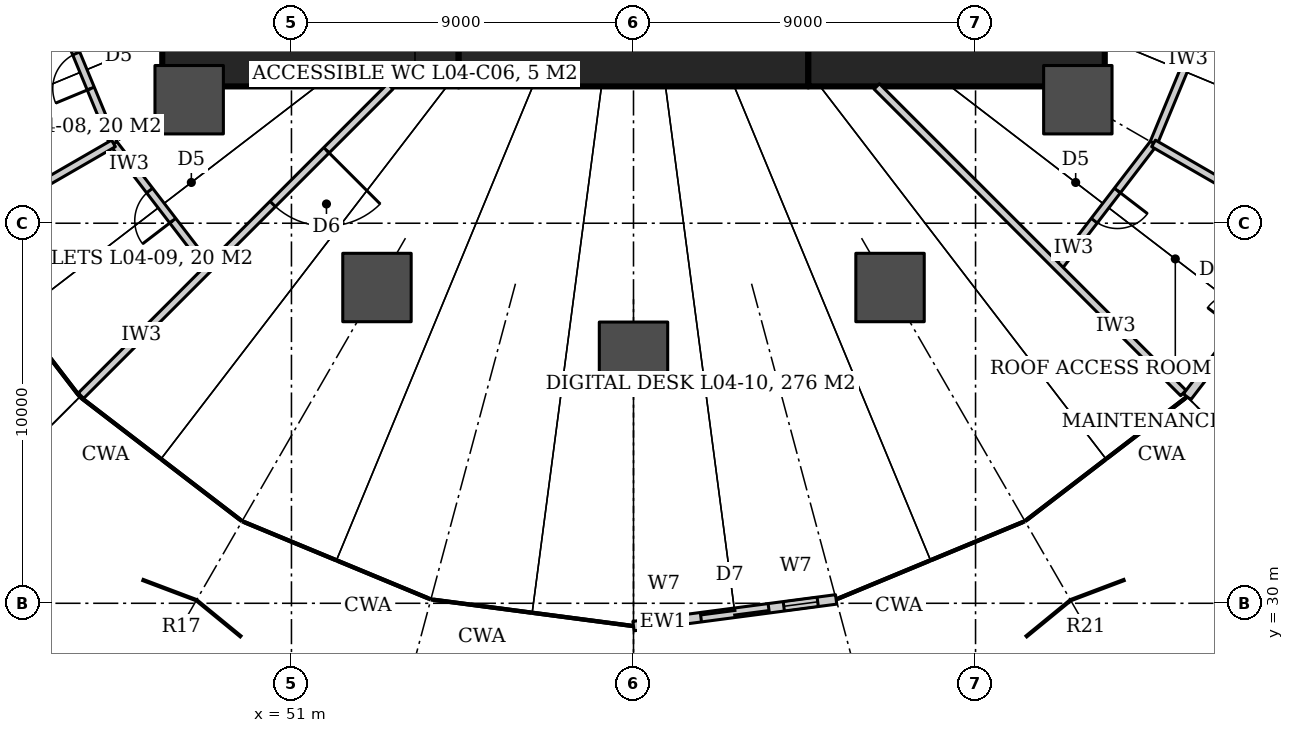
"""IFC4 building model, lengths in metres.
Left out: names, types, materials, properties, quantities, classifications, styles, units other than length and angle.
Written with IfcOpenShell. Run it as: python <this file> out.ifc"""

import sys

from ifc_helpers import new_model, si_unit, direction, frame, frame_2d, origin, origin_2d, place, context, subcontext, project, spatial, rectangle, hollow_circle, extrude, element, fill, save


model = new_model("IFC4")
c1 = context("Model", 3, precision=1e-05, world=origin(), true_north=direction((0.0, 1.0)))
c2 = subcontext(c1, "Body", "Model", "MODEL_VIEW")
j1 = project(units=[si_unit("LENGTHUNIT", "METRE"), si_unit("PLANEANGLEUNIT", "RADIAN")], contexts=[c1])
p1 = place(None, origin())
s1 = spatial("IfcSite", under=j1, at=p1, CompositionType="ELEMENT")
p2 = place(p1, origin())
s2 = spatial("IfcBuilding", under=s1, at=p2, CompositionType="ELEMENT")
p3 = place(p2, frame((0.0, 0.0, 26.0)))
s3 = spatial("IfcBuildingStorey", under=s2, at=p3, CompositionType="ELEMENT", Elevation=26.0)
p4 = place(p3, frame((47.6, 44.5, 0.0), z_axis=(0.0, 0.0, 1.0), x_axis=(1.0, 0.0, 0.0)))
e1 = element("IfcWall", 1, at=p4, inside=s3, PredefinedType="SHEAR", context=c2, shape_type="SweptSolid", body=[
    extrude(rectangle(XDim=7.8, YDim=1.8, at=frame_2d((3.9, 0.0))), origin(), (0.0, 0.0, 1.0), 4.2),
])
p5 = place(p3, frame((55.4, 44.5, 0.0), z_axis=(0.0, 0.0, 1.0), x_axis=(1.0, 0.0, 0.0)))
e2 = element("IfcWall", 2, at=p5, inside=s3, PredefinedType="SHEAR", context=c2, shape_type="SweptSolid", body=[
    extrude(rectangle(XDim=9.2, YDim=1.8, at=frame_2d((4.6, 0.0))), origin(), (0.0, 0.0, 1.0), 4.2),
])
p6 = place(p3, frame((64.6, 44.5, 0.0), z_axis=(0.0, 0.0, 1.0), x_axis=(1.0, 0.0, 0.0)))
e3 = element("IfcWall", 3, at=p6, inside=s3, PredefinedType="SHEAR", context=c2, shape_type="SweptSolid", body=[
    extrude(rectangle(XDim=7.8, YDim=1.8, at=frame_2d((3.9, 0.0))), origin(), (0.0, 0.0, 1.0), 4.2),
])
for number, where, z_axis, x_axis in (
    (4, (48.309, 43.25, -0.16), (0.0, 0.0, 1.0), (1.0, 0.0, 0.0)),
    (5, (53.25, 38.309, -0.16), (0.0, 0.0, 1.0), (1.0, 0.0, 0.0)),
    (6, (60.0, 36.5, -0.16), (0.0, 0.0, 1.0), (1.0, 0.0, 0.0)),
    (7, (66.75, 38.309, -0.16), (0.0, 0.0, 1.0), (1.0, 0.0, 0.0)),
    (8, (71.691, 43.25, -0.16), (0.0, 0.0, 1.0), (1.0, 0.0, 0.0)),
):
    element("IfcColumn", number, at=place(p3, frame(where, z_axis=z_axis, x_axis=x_axis)), inside=s3, PredefinedType="COLUMN", context=c2, shape_type="SweptSolid", body=[
        extrude(hollow_circle(Radius=0.9, WallThickness=0.09, at=origin_2d()), origin(), (0.0, 0.0, 1.0), 4.36),
    ])
p7 = place(p3, frame((48.828, 38.828, 0.0), z_axis=(0.0, 0.0, 1.0), x_axis=(-0.608714823874, 0.793389099494, 0.0)))
e9 = element("IfcWall", 9, at=p7, inside=s3, PredefinedType="PARTITIONING", context=c2, shape_type="SweptSolid", body=[
    extrude(rectangle(XDim=4.125, YDim=0.2, at=frame_2d((2.062, 0.0))), origin(), (0.0, 0.0, 1.0), 3.04),
])
p8 = place(p7, frame((1.562, 0.0, 0.0)))
e10 = element("IfcOpeningElement", 10, at=p8, cuts=e9, PredefinedType="OPENING", context=c2, shape_type="SweptSolid", body=[
    extrude(rectangle(XDim=1.0, YDim=2.1, at=frame_2d((0.5, 1.05))), frame((0.0, 0.11, 0.0), z_axis=(0.0, -1.0, 0.0), x_axis=(1.0, 0.0, 0.0)), (0.0, 0.0, 1.0), 0.22),
])
p9 = place(p3, frame((46.317, 42.1, 0.0), z_axis=(0.0, 0.0, 1.0), x_axis=(-0.382731667114, 0.923859551549, 0.0)))
e11 = element("IfcWall", 11, at=p9, inside=s3, PredefinedType="PARTITIONING", context=c2, shape_type="SweptSolid", body=[
    extrude(rectangle(XDim=4.125, YDim=0.2, at=frame_2d((2.062, 0.0))), origin(), (0.0, 0.0, 1.0), 3.04),
])
p10 = place(p9, frame((1.562, 0.0, 0.0)))
e12 = element("IfcOpeningElement", 12, at=p10, cuts=e11, PredefinedType="OPENING", context=c2, shape_type="SweptSolid", body=[
    extrude(rectangle(XDim=1.0, YDim=2.1, at=frame_2d((0.5, 1.05))), frame((0.0, 0.11, 0.0), z_axis=(0.0, -1.0, 0.0), x_axis=(1.0, 0.0, 0.0)), (0.0, 0.0, 1.0), 0.22),
])
p11 = place(p3, frame((75.262, 45.911, 0.0), z_axis=(0.0, 0.0, 1.0), x_axis=(-0.382731667114, -0.923859551549, 0.0)))
e13 = element("IfcWall", 13, at=p11, inside=s3, PredefinedType="PARTITIONING", context=c2, shape_type="SweptSolid", body=[
    extrude(rectangle(XDim=4.125, YDim=0.2, at=frame_2d((2.062, 0.0))), origin(), (0.0, 0.0, 1.0), 3.04),
])
p12 = place(p3, frame((73.683, 42.1, 0.0), z_axis=(0.0, 0.0, 1.0), x_axis=(-0.608714823874, -0.793389099494, 0.0)))
e14 = element("IfcWall", 14, at=p12, inside=s3, PredefinedType="PARTITIONING", context=c2, shape_type="SweptSolid", body=[
    extrude(rectangle(XDim=4.125, YDim=0.2, at=frame_2d((2.062, 0.0))), origin(), (0.0, 0.0, 1.0), 3.04),
])
p13 = place(p12, frame((1.562, 0.0, 0.0)))
e15 = element("IfcOpeningElement", 15, at=p13, cuts=e14, PredefinedType="OPENING", context=c2, shape_type="SweptSolid", body=[
    extrude(rectangle(XDim=1.0, YDim=2.1, at=frame_2d((0.5, 1.05))), frame((0.0, 0.11, 0.0), z_axis=(0.0, -1.0, 0.0), x_axis=(1.0, 0.0, 0.0)), (0.0, 0.0, 1.0), 0.22),
])
p14 = place(p3, frame((46.317, 42.1, 0.0), z_axis=(0.0, 0.0, 1.0), x_axis=(-0.866015616091, -0.5000169524, 0.0)))
e16 = element("IfcWall", 16, at=p14, inside=s3, PredefinedType="PARTITIONING", context=c2, shape_type="SweptSolid", body=[
    extrude(rectangle(XDim=4.76, YDim=0.2, at=frame_2d((2.38, 0.0))), origin(), (0.0, 0.0, 1.0), 3.04),
])
p15 = place(p3, frame((53.6, 43.6, 0.0), z_axis=(0.0, 0.0, 1.0), x_axis=(-0.707106781187, -0.707106781187, 0.0)))
e17 = element("IfcWall", 17, at=p15, inside=s3, PredefinedType="PARTITIONING", context=c2, shape_type="SweptSolid", body=[
    extrude(rectangle(XDim=11.509, YDim=0.2, at=frame_2d((5.754, 0.0))), origin(), (0.0, 0.0, 1.0), 3.02),
])
p16 = place(p15, frame((2.375, 0.0, 0.0)))
e18 = element("IfcOpeningElement", 18, at=p16, cuts=e17, PredefinedType="OPENING", context=c2, shape_type="SweptSolid", body=[
    extrude(rectangle(XDim=2.0, YDim=2.1, at=frame_2d((1.0, 1.05))), frame((0.0, 0.11, 0.0), z_axis=(0.0, -1.0, 0.0), x_axis=(1.0, 0.0, 0.0)), (0.0, 0.0, 1.0), 0.22),
])
p17 = place(p3, frame((66.4, 43.6, 0.0), z_axis=(0.0, 0.0, 1.0), x_axis=(0.707106781187, -0.707106781187, 0.0)))
e19 = element("IfcWall", 19, at=p17, inside=s3, PredefinedType="PARTITIONING", context=c2, shape_type="SweptSolid", body=[
    extrude(rectangle(XDim=11.409, YDim=0.2, at=frame_2d((5.705, 0.0))), origin(), (0.0, 0.0, 1.0), 3.02),
])
p18 = place(p3, frame((73.683, 42.1, 0.0), z_axis=(0.0, 0.0, 1.0), x_axis=(0.866029425763, -0.499993033663, 0.0)))
e20 = element("IfcWall", 20, at=p18, inside=s3, PredefinedType="PARTITIONING", context=c2, shape_type="SweptSolid", body=[
    extrude(rectangle(XDim=4.66, YDim=0.2, at=frame_2d((2.33, 0.0))), origin(), (0.0, 0.0, 1.0), 3.04),
])
p19 = place(p3, frame((60.0, 29.4, 0.0), z_axis=(0.0, 0.0, 1.0), x_axis=(0.991445794844, 0.130519101615, 0.0)))
e21 = element("IfcWall", 21, at=p19, inside=s3, PredefinedType="SOLIDWALL", context=c2, shape_type="SweptSolid", body=[
    extrude(rectangle(XDim=5.378, YDim=0.25, at=frame_2d((2.689, 0.0))), origin(), (0.0, 0.0, 1.0), 4.04),
])
p20 = place(p19, frame((1.789, 0.0, 0.0)))
e22 = element("IfcOpeningElement", 22, at=p20, cuts=e21, PredefinedType="OPENING", context=c2, shape_type="SweptSolid", body=[
    extrude(rectangle(XDim=1.8, YDim=2.4, at=frame_2d((0.9, 1.2))), frame((0.0, 0.135, 0.0), z_axis=(0.0, -1.0, 0.0), x_axis=(1.0, 0.0, 0.0)), (0.0, 0.0, 1.0), 0.27),
])
p21 = place(p19, frame((0.489, 0.0, 0.0)))
e23 = element("IfcOpeningElement", 23, at=p21, cuts=e21, PredefinedType="OPENING", context=c2, shape_type="SweptSolid", body=[
    extrude(rectangle(XDim=0.9, YDim=2.4, at=frame_2d((0.45, 1.2))), frame((0.0, 0.135, 0.0), z_axis=(0.0, -1.0, 0.0), x_axis=(1.0, 0.0, 0.0)), (0.0, 0.0, 1.0), 0.27),
])
p22 = place(p19, frame((3.989, 0.0, 0.0)))
e24 = element("IfcOpeningElement", 24, at=p22, cuts=e21, PredefinedType="OPENING", context=c2, shape_type="SweptSolid", body=[
    extrude(rectangle(XDim=0.9, YDim=2.4, at=frame_2d((0.45, 1.2))), frame((0.0, 0.135, 0.0), z_axis=(0.0, -1.0, 0.0), x_axis=(1.0, 0.0, 0.0)), (0.0, 0.0, 1.0), 0.27),
])
p23 = place(p3, frame((74.566, 35.434, 0.0), z_axis=(0.0, 0.0, 1.0), x_axis=(0.608760311307, 0.793354197933, 0.0)))
e25 = element("IfcWall", 25, at=p23, inside=s3, PredefinedType="SOLIDWALL", context=c2, shape_type="SweptSolid", body=[
    extrude(rectangle(XDim=5.378, YDim=0.25, at=frame_2d((2.689, 0.0))), origin(), (0.0, 0.0, 1.0), 4.04),
])
p24 = place(p23, frame((2.189, 0.0, 0.0)))
e26 = element("IfcOpeningElement", 26, at=p24, cuts=e25, PredefinedType="OPENING", context=c2, shape_type="SweptSolid", body=[
    extrude(rectangle(XDim=1.0, YDim=2.1, at=frame_2d((0.5, 1.05))), frame((0.0, 0.135, 0.0), z_axis=(0.0, -1.0, 0.0), x_axis=(1.0, 0.0, 0.0)), (0.0, 0.0, 1.0), 0.27),
])
p25 = place(p10, origin())
e27 = element("IfcDoor", 27, at=p25, inside=s3, OperationType="SINGLE_SWING_LEFT", PredefinedType="DOOR", context=c2, shape_type="SweptSolid", body=[
    extrude(rectangle(XDim=1.0, YDim=2.1, at=frame_2d((0.5, 1.05))), frame((0.0, 0.025, 0.0), z_axis=(0.0, -1.0, 0.0), x_axis=(1.0, 0.0, 0.0)), (0.0, 0.0, 1.0), 0.05),
])
fill(e12, e27)
p26 = place(p8, origin())
e28 = element("IfcDoor", 28, at=p26, inside=s3, OperationType="SINGLE_SWING_LEFT", PredefinedType="DOOR", context=c2, shape_type="SweptSolid", body=[
    extrude(rectangle(XDim=1.0, YDim=2.1, at=frame_2d((0.5, 1.05))), frame((0.0, 0.025, 0.0), z_axis=(0.0, -1.0, 0.0), x_axis=(1.0, 0.0, 0.0)), (0.0, 0.0, 1.0), 0.05),
])
fill(e10, e28)
p27 = place(p16, origin())
e29 = element("IfcDoor", 29, at=p27, inside=s3, OperationType="DOUBLE_DOOR_DOUBLE_SWING", PredefinedType="DOOR", context=c2, shape_type="SweptSolid", body=[
    extrude(rectangle(XDim=2.0, YDim=2.1, at=frame_2d((1.0, 1.05))), frame((0.0, 0.025, 0.0), z_axis=(0.0, -1.0, 0.0), x_axis=(1.0, 0.0, 0.0)), (0.0, 0.0, 1.0), 0.05),
])
fill(e18, e29)
p28 = place(p13, origin())
e30 = element("IfcDoor", 30, at=p28, inside=s3, OperationType="SINGLE_SWING_LEFT", PredefinedType="DOOR", context=c2, shape_type="SweptSolid", body=[
    extrude(rectangle(XDim=1.0, YDim=2.1, at=frame_2d((0.5, 1.05))), frame((0.0, 0.025, 0.0), z_axis=(0.0, -1.0, 0.0), x_axis=(1.0, 0.0, 0.0)), (0.0, 0.0, 1.0), 0.05),
])
fill(e15, e30)
p29 = place(p20, origin())
e31 = element("IfcDoor", 31, at=p29, inside=s3, OperationType="DOUBLE_DOOR_SLIDING", PredefinedType="DOOR", context=c2, shape_type="SweptSolid", body=[
    extrude(rectangle(XDim=1.8, YDim=2.4, at=frame_2d((0.9, 1.2))), frame((0.0, 0.025, 0.0), z_axis=(0.0, -1.0, 0.0), x_axis=(1.0, 0.0, 0.0)), (0.0, 0.0, 1.0), 0.05),
])
fill(e22, e31)
p30 = place(p21, origin())
e32 = element("IfcWindow", 32, at=p30, inside=s3, PartitioningType="SINGLE_PANEL", PredefinedType="WINDOW", context=c2, shape_type="SweptSolid", body=[
    extrude(rectangle(XDim=0.9, YDim=2.4, at=frame_2d((0.45, 1.2))), frame((0.0, 0.03, 0.0), z_axis=(0.0, -1.0, 0.0), x_axis=(1.0, 0.0, 0.0)), (0.0, 0.0, 1.0), 0.06),
])
fill(e23, e32)
p31 = place(p22, origin())
e33 = element("IfcWindow", 33, at=p31, inside=s3, PartitioningType="SINGLE_PANEL", PredefinedType="WINDOW", context=c2, shape_type="SweptSolid", body=[
    extrude(rectangle(XDim=0.9, YDim=2.4, at=frame_2d((0.45, 1.2))), frame((0.0, 0.03, 0.0), z_axis=(0.0, -1.0, 0.0), x_axis=(1.0, 0.0, 0.0)), (0.0, 0.0, 1.0), 0.06),
])
fill(e24, e33)
save(model, sys.argv[1])
